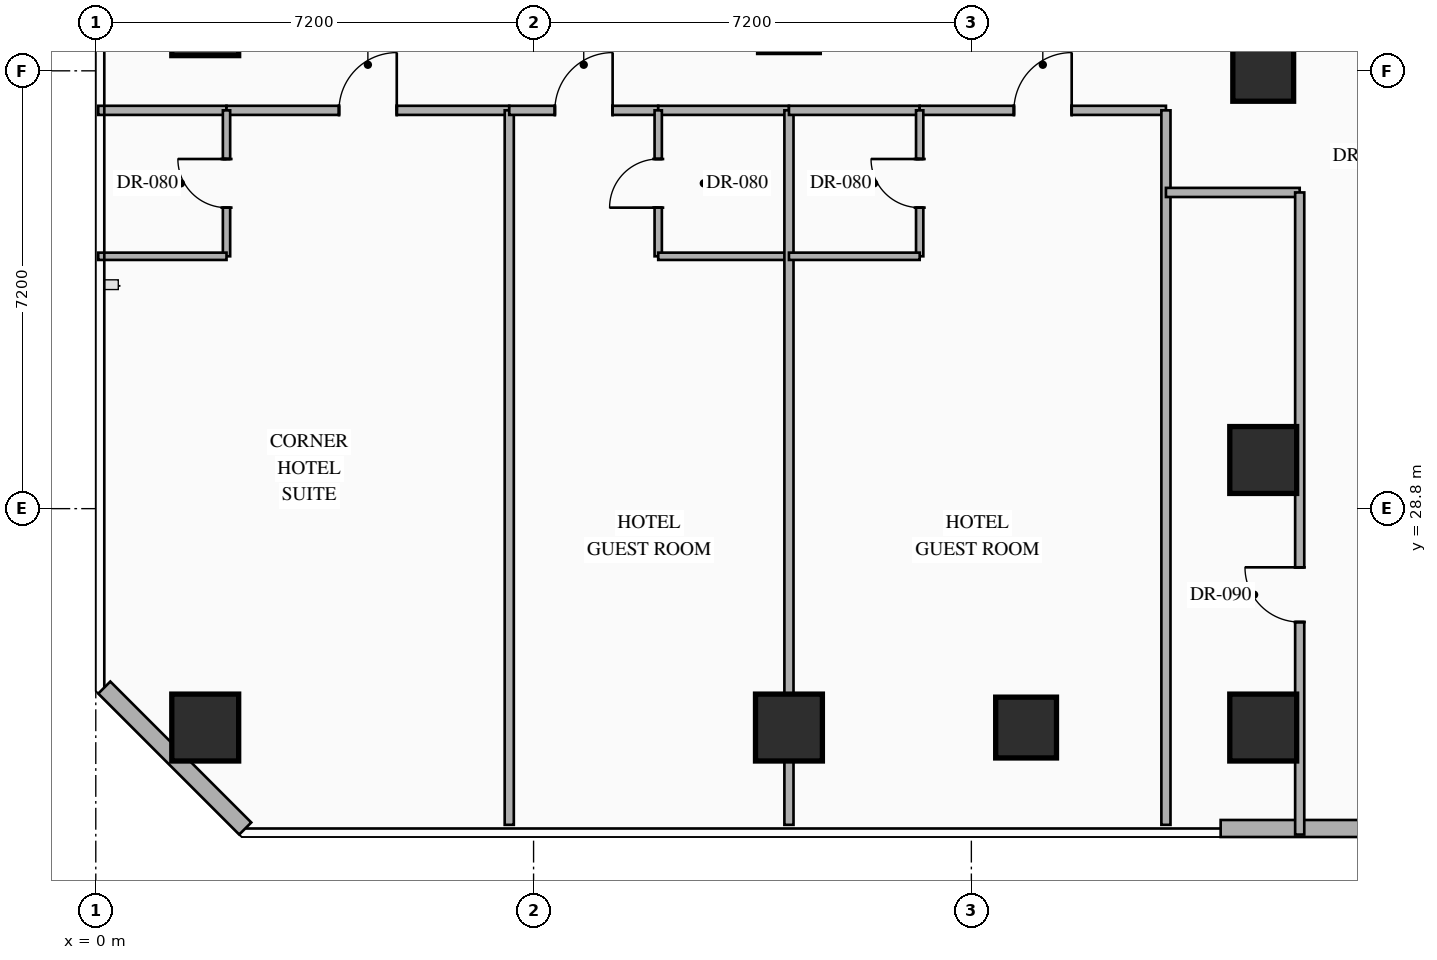
"""IFC4 building model, lengths in metres.
Left out: names, types, materials, properties, quantities, classifications, styles, units other than length and angle.
Written with IfcOpenShell. Run it as: python <this file> out.ifc"""

import sys

from ifc_helpers import new_model, si_unit, direction, frame, frame_2d, origin, origin_2d, place, context, subcontext, project, spatial, rectangle, hollow_rectangle, extrude, element, fill, save


model = new_model("IFC4")
c1 = context("Model", 3, precision=1e-05, world=origin(), true_north=direction((0.0, 1.0)))
c2 = subcontext(c1, "Body", "Model", "MODEL_VIEW")
j1 = project(units=[si_unit("LENGTHUNIT", "METRE"), si_unit("PLANEANGLEUNIT", "RADIAN")], contexts=[c1])
p1 = place(None, origin())
s1 = spatial("IfcSite", under=j1, at=p1, CompositionType="ELEMENT")
p2 = place(p1, origin())
s2 = spatial("IfcBuilding", under=s1, at=p2, CompositionType="ELEMENT")
p3 = place(p2, frame((0.0, 0.0, 50.0)))
s3 = spatial("IfcBuildingStorey", under=s2, at=p3, CompositionType="ELEMENT", Elevation=50.0)
for number, where, z_axis, x_axis in (
    (1, (1.8, 25.2, 0.0), (0.0, 0.0, 1.0), (1.0, 0.0, 0.0)),
    (2, (1.8, 36.8, 0.0), (0.0, 0.0, 1.0), (1.0, 0.0, 0.0)),
    (3, (11.4, 25.2, 0.0), (0.0, 0.0, 1.0), (1.0, 0.0, 0.0)),
    (4, (19.2, 25.2, 0.0), (0.0, 0.0, 1.0), (1.0, 0.0, 0.0)),
    (5, (19.2, 29.6, 0.0), (0.0, 0.0, 1.0), (1.0, 0.0, 0.0)),
):
    element("IfcColumn", number, at=place(p3, frame(where, z_axis=z_axis, x_axis=x_axis)), inside=s3, PredefinedType="COLUMN", context=c2, shape_type="SweptSolid", body=[
        extrude(hollow_rectangle(XDim=1.1, YDim=1.1, WallThickness=0.04, at=origin_2d()), origin(), (0.0, 0.0, 1.0), 3.35),
    ])
for number, where, z_axis, x_axis in (
    (6, (19.2, 36.0, 0.0), (0.0, 0.0, 1.0), (1.0, 0.0, 0.0)),
    (7, (15.3, 25.2, 0.0), (0.0, 0.0, 1.0), (1.0, 0.0, 0.0)),
):
    element("IfcColumn", number, at=place(p3, frame(where, z_axis=z_axis, x_axis=x_axis)), inside=s3, PredefinedType="COLUMN", context=c2, shape_type="SweptSolid", body=[
        extrude(hollow_rectangle(XDim=1.0, YDim=1.0, WallThickness=0.038, at=origin_2d()), origin(), (0.0, 0.0, 1.0), 3.35),
    ])
p4 = place(p3, frame((25.247, 23.54, 0.0), z_axis=(0.0, 0.0, 1.0), x_axis=(-1.0, 0.0, 0.0)))
e8 = element("IfcWall", 8, at=p4, inside=s3, PredefinedType="STANDARD", context=c2, shape_type="SweptSolid", body=[
    extrude(rectangle(XDim=6.747, YDim=0.28, at=frame_2d((3.374, 0.0))), origin(), (0.0, 0.0, 1.0), 3.13),
])
p5 = place(p3, frame((2.458, 23.54, 0.0), z_axis=(0.0, 0.0, 1.0), x_axis=(-0.707144017911, 0.707069542501, 0.0)))
e9 = element("IfcWall", 9, at=p5, inside=s3, PredefinedType="STANDARD", context=c2, shape_type="SweptSolid", body=[
    extrude(rectangle(XDim=3.278, YDim=0.28, at=frame_2d((1.639, 0.0))), origin(), (0.0, 0.0, 1.0), 3.13),
])
p6 = place(p3, frame((0.04, 35.35, 0.0), z_axis=(0.0, 0.0, 1.0), x_axis=(1.0, 0.0, 0.0)))
e10 = element("IfcWall", 10, at=p6, inside=s3, PredefinedType="PARTITIONING", context=c2, shape_type="SweptSolid", body=[
    extrude(rectangle(XDim=2.11, YDim=0.15, at=frame_2d((1.055, 0.0))), origin(), (0.0, 0.0, 1.0), 3.13),
])
p7 = place(p3, frame((2.15, 35.35, 0.0), z_axis=(0.0, 0.0, 1.0), x_axis=(1.0, 0.0, 0.0)))
e11 = element("IfcWall", 11, at=p7, inside=s3, PredefinedType="PARTITIONING", context=c2, shape_type="SweptSolid", body=[
    extrude(rectangle(XDim=4.65, YDim=0.15, at=frame_2d((2.325, 0.0))), origin(), (0.0, 0.0, 1.0), 3.13),
])
p8 = place(p7, frame((1.85, 0.0, 0.0)))
e12 = element("IfcOpeningElement", 12, at=p8, cuts=e11, PredefinedType="OPENING", context=c2, shape_type="SweptSolid", body=[
    extrude(rectangle(XDim=0.95, YDim=2.15, at=frame_2d((0.475, 1.075))), frame((0.0, 0.085, 0.0), z_axis=(0.0, -1.0, 0.0), x_axis=(1.0, 0.0, 0.0)), (0.0, 0.0, 1.0), 0.17),
])
p9 = place(p3, frame((2.15, 32.95, 0.0), z_axis=(0.0, 0.0, 1.0), x_axis=(0.0, 1.0, 0.0)))
e13 = element("IfcWall", 13, at=p9, inside=s3, PredefinedType="PARTITIONING", context=c2, shape_type="SweptSolid", body=[
    extrude(rectangle(XDim=2.4, YDim=0.12, at=frame_2d((1.2, 0.0))), origin(), (0.0, 0.0, 1.0), 3.13),
])
p10 = place(p9, frame((0.8, 0.0, 0.0)))
e14 = element("IfcOpeningElement", 14, at=p10, cuts=e13, PredefinedType="OPENING", context=c2, shape_type="SweptSolid", body=[
    extrude(rectangle(XDim=0.8, YDim=2.06, at=frame_2d((0.4, 1.03))), frame((0.0, 0.07, 0.0), z_axis=(0.0, -1.0, 0.0), x_axis=(1.0, 0.0, 0.0)), (0.0, 0.0, 1.0), 0.14),
])
p11 = place(p3, frame((0.04, 32.95, 0.0), z_axis=(0.0, 0.0, 1.0), x_axis=(1.0, 0.0, 0.0)))
e15 = element("IfcWall", 15, at=p11, inside=s3, PredefinedType="PARTITIONING", context=c2, shape_type="SweptSolid", body=[
    extrude(rectangle(XDim=2.11, YDim=0.12, at=frame_2d((1.055, 0.0))), origin(), (0.0, 0.0, 1.0), 3.13),
])
p12 = place(p3, frame((6.8, 23.6, 0.0), z_axis=(0.0, 0.0, 1.0), x_axis=(0.0, 1.0, 0.0)))
e16 = element("IfcWall", 16, at=p12, inside=s3, PredefinedType="PARTITIONING", context=c2, shape_type="SweptSolid", body=[
    extrude(rectangle(XDim=11.75, YDim=0.15, at=frame_2d((5.875, 0.0))), origin(), (0.0, 0.0, 1.0), 3.13),
])
p13 = place(p3, frame((6.8, 35.35, 0.0), z_axis=(0.0, 0.0, 1.0), x_axis=(1.0, 0.0, 0.0)))
e17 = element("IfcWall", 17, at=p13, inside=s3, PredefinedType="PARTITIONING", context=c2, shape_type="SweptSolid", body=[
    extrude(rectangle(XDim=2.45, YDim=0.15, at=frame_2d((1.225, 0.0))), origin(), (0.0, 0.0, 1.0), 3.13),
])
p14 = place(p13, frame((0.75, 0.0, 0.0)))
e18 = element("IfcOpeningElement", 18, at=p14, cuts=e17, PredefinedType="OPENING", context=c2, shape_type="SweptSolid", body=[
    extrude(rectangle(XDim=0.95, YDim=2.15, at=frame_2d((0.475, 1.075))), frame((0.0, 0.085, 0.0), z_axis=(0.0, -1.0, 0.0), x_axis=(1.0, 0.0, 0.0)), (0.0, 0.0, 1.0), 0.17),
])
p15 = place(p3, frame((9.25, 35.35, 0.0), z_axis=(0.0, 0.0, 1.0), x_axis=(1.0, 0.0, 0.0)))
e19 = element("IfcWall", 19, at=p15, inside=s3, PredefinedType="PARTITIONING", context=c2, shape_type="SweptSolid", body=[
    extrude(rectangle(XDim=2.15, YDim=0.15, at=frame_2d((1.075, 0.0))), origin(), (0.0, 0.0, 1.0), 3.13),
])
p16 = place(p3, frame((9.25, 32.95, 0.0), z_axis=(0.0, 0.0, 1.0), x_axis=(0.0, 1.0, 0.0)))
e20 = element("IfcWall", 20, at=p16, inside=s3, PredefinedType="PARTITIONING", context=c2, shape_type="SweptSolid", body=[
    extrude(rectangle(XDim=2.4, YDim=0.12, at=frame_2d((1.2, 0.0))), origin(), (0.0, 0.0, 1.0), 3.13),
])
p17 = place(p16, frame((0.8, 0.0, 0.0)))
e21 = element("IfcOpeningElement", 21, at=p17, cuts=e20, PredefinedType="OPENING", context=c2, shape_type="SweptSolid", body=[
    extrude(rectangle(XDim=0.8, YDim=2.06, at=frame_2d((0.4, 1.03))), frame((0.0, 0.07, 0.0), z_axis=(0.0, -1.0, 0.0), x_axis=(1.0, 0.0, 0.0)), (0.0, 0.0, 1.0), 0.14),
])
p18 = place(p3, frame((9.25, 32.95, 0.0), z_axis=(0.0, 0.0, 1.0), x_axis=(1.0, 0.0, 0.0)))
e22 = element("IfcWall", 22, at=p18, inside=s3, PredefinedType="PARTITIONING", context=c2, shape_type="SweptSolid", body=[
    extrude(rectangle(XDim=2.15, YDim=0.12, at=frame_2d((1.075, 0.0))), origin(), (0.0, 0.0, 1.0), 3.13),
])
p19 = place(p3, frame((11.4, 23.6, 0.0), z_axis=(0.0, 0.0, 1.0), x_axis=(0.0, 1.0, 0.0)))
e23 = element("IfcWall", 23, at=p19, inside=s3, PredefinedType="PARTITIONING", context=c2, shape_type="SweptSolid", body=[
    extrude(rectangle(XDim=11.75, YDim=0.15, at=frame_2d((5.875, 0.0))), origin(), (0.0, 0.0, 1.0), 2.425),
])
p20 = place(p3, frame((11.4, 35.35, 0.0), z_axis=(0.0, 0.0, 1.0), x_axis=(1.0, 0.0, 0.0)))
e24 = element("IfcWall", 24, at=p20, inside=s3, PredefinedType="PARTITIONING", context=c2, shape_type="SweptSolid", body=[
    extrude(rectangle(XDim=2.15, YDim=0.15, at=frame_2d((1.075, 0.0))), origin(), (0.0, 0.0, 1.0), 3.13),
])
p21 = place(p3, frame((13.55, 35.35, 0.0), z_axis=(0.0, 0.0, 1.0), x_axis=(1.0, 0.0, 0.0)))
e25 = element("IfcWall", 25, at=p21, inside=s3, PredefinedType="PARTITIONING", context=c2, shape_type="SweptSolid", body=[
    extrude(rectangle(XDim=4.05, YDim=0.15, at=frame_2d((2.025, 0.0))), origin(), (0.0, 0.0, 1.0), 3.13),
])
p22 = place(p21, frame((1.55, 0.0, 0.0)))
e26 = element("IfcOpeningElement", 26, at=p22, cuts=e25, PredefinedType="OPENING", context=c2, shape_type="SweptSolid", body=[
    extrude(rectangle(XDim=0.95, YDim=2.15, at=frame_2d((0.475, 1.075))), frame((0.0, 0.085, 0.0), z_axis=(0.0, -1.0, 0.0), x_axis=(1.0, 0.0, 0.0)), (0.0, 0.0, 1.0), 0.17),
])
p23 = place(p3, frame((13.55, 32.95, 0.0), z_axis=(0.0, 0.0, 1.0), x_axis=(0.0, 1.0, 0.0)))
e27 = element("IfcWall", 27, at=p23, inside=s3, PredefinedType="PARTITIONING", context=c2, shape_type="SweptSolid", body=[
    extrude(rectangle(XDim=2.4, YDim=0.12, at=frame_2d((1.2, 0.0))), origin(), (0.0, 0.0, 1.0), 3.13),
])
p24 = place(p23, frame((0.8, 0.0, 0.0)))
e28 = element("IfcOpeningElement", 28, at=p24, cuts=e27, PredefinedType="OPENING", context=c2, shape_type="SweptSolid", body=[
    extrude(rectangle(XDim=0.8, YDim=2.06, at=frame_2d((0.4, 1.03))), frame((0.0, 0.07, 0.0), z_axis=(0.0, -1.0, 0.0), x_axis=(1.0, 0.0, 0.0)), (0.0, 0.0, 1.0), 0.14),
])
p25 = place(p3, frame((11.4, 32.95, 0.0), z_axis=(0.0, 0.0, 1.0), x_axis=(1.0, 0.0, 0.0)))
e29 = element("IfcWall", 29, at=p25, inside=s3, PredefinedType="PARTITIONING", context=c2, shape_type="SweptSolid", body=[
    extrude(rectangle(XDim=2.15, YDim=0.12, at=frame_2d((1.075, 0.0))), origin(), (0.0, 0.0, 1.0), 3.13),
])
p26 = place(p3, frame((17.6, 23.6, 0.0), z_axis=(0.0, 0.0, 1.0), x_axis=(0.0, 1.0, 0.0)))
e30 = element("IfcWall", 30, at=p26, inside=s3, PredefinedType="PARTITIONING", context=c2, shape_type="SweptSolid", body=[
    extrude(rectangle(XDim=11.75, YDim=0.15, at=frame_2d((5.875, 0.0))), origin(), (0.0, 0.0, 1.0), 3.13),
])
p27 = place(p3, frame((17.6, 34.0, 0.0), z_axis=(0.0, 0.0, 1.0), x_axis=(1.0, 0.0, 0.0)))
e31 = element("IfcWall", 31, at=p27, inside=s3, PredefinedType="PARTITIONING", context=c2, shape_type="SweptSolid", body=[
    extrude(rectangle(XDim=2.2, YDim=0.15, at=frame_2d((1.1, 0.0))), origin(), (0.0, 0.0, 1.0), 3.13),
])
p28 = place(p3, frame((19.8, 23.44, 0.0), z_axis=(0.0, 0.0, 1.0), x_axis=(0.0, 1.0, 0.0)))
e32 = element("IfcWall", 32, at=p28, inside=s3, PredefinedType="PARTITIONING", context=c2, shape_type="SweptSolid", body=[
    extrude(rectangle(XDim=10.56, YDim=0.15, at=frame_2d((5.28, 0.0))), origin(), (0.0, 0.0, 1.0), 3.13),
])
p29 = place(p28, frame((3.495, 0.0, 0.0)))
e33 = element("IfcOpeningElement", 33, at=p29, cuts=e32, PredefinedType="OPENING", context=c2, shape_type="SweptSolid", body=[
    extrude(rectangle(XDim=0.9, YDim=2.15, at=frame_2d((0.45, 1.075))), frame((0.0, 0.085, 0.0), z_axis=(0.0, -1.0, 0.0), x_axis=(1.0, 0.0, 0.0)), (0.0, 0.0, 1.0), 0.17),
])
p30 = place(p8, origin())
e34 = element("IfcDoor", 34, at=p30, inside=s3, OperationType="SINGLE_SWING_RIGHT", PredefinedType="DOOR", context=c2, shape_type="SweptSolid", body=[
    extrude(rectangle(XDim=0.95, YDim=2.15, at=frame_2d((0.475, 1.075))), frame((0.0, 0.025, 0.0), z_axis=(0.0, -1.0, 0.0), x_axis=(1.0, 0.0, 0.0)), (0.0, 0.0, 1.0), 0.05),
])
fill(e12, e34)
p31 = place(p10, origin())
e35 = element("IfcDoor", 35, at=p31, inside=s3, OperationType="SINGLE_SWING_RIGHT", PredefinedType="DOOR", context=c2, shape_type="SweptSolid", body=[
    extrude(rectangle(XDim=0.8, YDim=2.06, at=frame_2d((0.4, 1.03))), frame((0.0, 0.025, 0.0), z_axis=(0.0, -1.0, 0.0), x_axis=(1.0, 0.0, 0.0)), (0.0, 0.0, 1.0), 0.05),
])
fill(e14, e35)
p32 = place(p14, origin())
e36 = element("IfcDoor", 36, at=p32, inside=s3, OperationType="SINGLE_SWING_RIGHT", PredefinedType="DOOR", context=c2, shape_type="SweptSolid", body=[
    extrude(rectangle(XDim=0.95, YDim=2.15, at=frame_2d((0.475, 1.075))), frame((0.0, 0.025, 0.0), z_axis=(0.0, -1.0, 0.0), x_axis=(1.0, 0.0, 0.0)), (0.0, 0.0, 1.0), 0.05),
])
fill(e18, e36)
p33 = place(p17, origin())
e37 = element("IfcDoor", 37, at=p33, inside=s3, OperationType="SINGLE_SWING_LEFT", PredefinedType="DOOR", context=c2, shape_type="SweptSolid", body=[
    extrude(rectangle(XDim=0.8, YDim=2.06, at=frame_2d((0.4, 1.03))), frame((0.0, 0.025, 0.0), z_axis=(0.0, -1.0, 0.0), x_axis=(1.0, 0.0, 0.0)), (0.0, 0.0, 1.0), 0.05),
])
fill(e21, e37)
p34 = place(p22, origin())
e38 = element("IfcDoor", 38, at=p34, inside=s3, OperationType="SINGLE_SWING_RIGHT", PredefinedType="DOOR", context=c2, shape_type="SweptSolid", body=[
    extrude(rectangle(XDim=0.95, YDim=2.15, at=frame_2d((0.475, 1.075))), frame((0.0, 0.025, 0.0), z_axis=(0.0, -1.0, 0.0), x_axis=(1.0, 0.0, 0.0)), (0.0, 0.0, 1.0), 0.05),
])
fill(e26, e38)
p35 = place(p24, origin())
e39 = element("IfcDoor", 39, at=p35, inside=s3, OperationType="SINGLE_SWING_RIGHT", PredefinedType="DOOR", context=c2, shape_type="SweptSolid", body=[
    extrude(rectangle(XDim=0.8, YDim=2.06, at=frame_2d((0.4, 1.03))), frame((0.0, 0.025, 0.0), z_axis=(0.0, -1.0, 0.0), x_axis=(1.0, 0.0, 0.0)), (0.0, 0.0, 1.0), 0.05),
])
fill(e28, e39)
p36 = place(p29, origin())
e40 = element("IfcDoor", 40, at=p36, inside=s3, OperationType="SINGLE_SWING_RIGHT", PredefinedType="DOOR", context=c2, shape_type="SweptSolid", body=[
    extrude(rectangle(XDim=0.9, YDim=2.15, at=frame_2d((0.45, 1.075))), frame((0.0, 0.025, 0.0), z_axis=(0.0, -1.0, 0.0), x_axis=(1.0, 0.0, 0.0)), (0.0, 0.0, 1.0), 0.05),
])
fill(e33, e40)
save(model, sys.argv[1])
